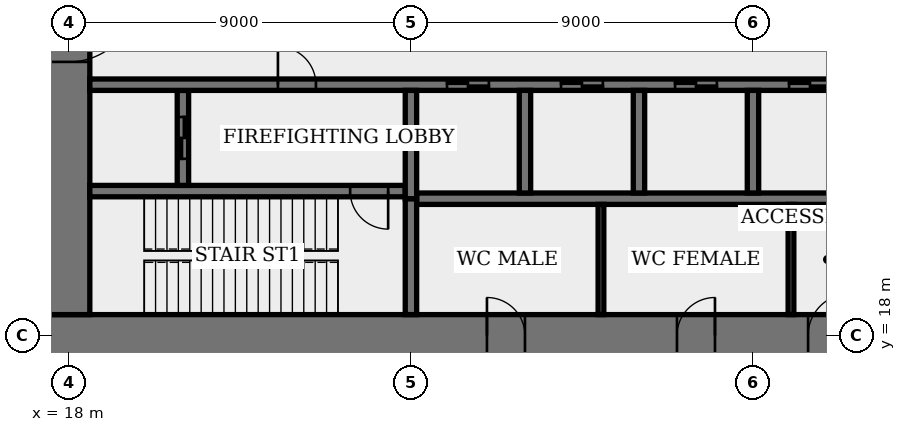
"""IFC4 building model, lengths in metres.
Left out: names, types, materials, properties, quantities, classifications, styles, units other than length and angle.
Written with IfcOpenShell. Run it as: python <this file> out.ifc"""

import sys

from ifc_helpers import new_model, si_unit, direction, frame, frame_2d, origin, place, context, subcontext, project, spatial, rectangle, extrude, element, fill, save


model = new_model("IFC4")
c1 = context("Model", 3, precision=1e-05, world=origin(), true_north=direction((0.0, 1.0)))
c2 = subcontext(c1, "Body", "Model", "MODEL_VIEW")
j1 = project(units=[si_unit("LENGTHUNIT", "METRE"), si_unit("PLANEANGLEUNIT", "RADIAN")], contexts=[c1])
p1 = place(None, origin())
s1 = spatial("IfcSite", under=j1, at=p1, CompositionType="ELEMENT")
p2 = place(p1, origin())
s2 = spatial("IfcBuilding", under=s1, at=p2, CompositionType="ELEMENT")
p3 = place(p2, origin())
s3 = spatial("IfcBuildingStorey", under=s2, at=p3, CompositionType="ELEMENT", Elevation=0.0)
p4 = place(p3, frame((17.45, 18.0, 0.0), z_axis=(0.0, 0.0, 1.0), x_axis=(1.0, 0.0, 0.0)))
e1 = element("IfcWall", 1, at=p4, inside=s3, PredefinedType="SHEAR", context=c2, shape_type="SweptSolid", body=[
    extrude(rectangle(XDim=28.1, YDim=1.1, at=frame_2d((14.05, 0.0))), origin(), (0.0, 0.0, 1.0), 5.4),
])
p5 = place(p4, frame((11.55, 0.0, 0.0)))
e2 = element("IfcOpeningElement", 2, at=p5, cuts=e1, PredefinedType="OPENING", context=c2, shape_type="SweptSolid", body=[
    extrude(rectangle(XDim=1.0, YDim=2.4, at=frame_2d((0.5, 1.2))), frame((0.0, 0.56, 0.0), z_axis=(0.0, -1.0, 0.0), x_axis=(1.0, 0.0, 0.0)), (0.0, 0.0, 1.0), 1.12),
])
p6 = place(p4, frame((16.55, 0.0, 0.0)))
e3 = element("IfcOpeningElement", 3, at=p6, cuts=e1, PredefinedType="OPENING", context=c2, shape_type="SweptSolid", body=[
    extrude(rectangle(XDim=1.0, YDim=2.4, at=frame_2d((0.5, 1.2))), frame((0.0, 0.56, 0.0), z_axis=(0.0, -1.0, 0.0), x_axis=(1.0, 0.0, 0.0)), (0.0, 0.0, 1.0), 1.12),
])
p7 = place(p4, frame((20.0, 0.0, 0.0)))
e4 = element("IfcOpeningElement", 4, at=p7, cuts=e1, PredefinedType="OPENING", context=c2, shape_type="SweptSolid", body=[
    extrude(rectangle(XDim=1.1, YDim=2.4, at=frame_2d((0.55, 1.2))), frame((0.0, 0.56, 0.0), z_axis=(0.0, -1.0, 0.0), x_axis=(1.0, 0.0, 0.0)), (0.0, 0.0, 1.0), 1.12),
])
p8 = place(p4, frame((24.05, 0.0, 0.0)))
e5 = element("IfcOpeningElement", 5, at=p8, cuts=e1, PredefinedType="OPENING", context=c2, shape_type="SweptSolid", body=[
    extrude(rectangle(XDim=1.0, YDim=2.4, at=frame_2d((0.5, 1.2))), frame((0.0, 0.56, 0.0), z_axis=(0.0, -1.0, 0.0), x_axis=(1.0, 0.0, 0.0)), (0.0, 0.0, 1.0), 1.12),
])
p9 = place(p3, frame((18.0, 35.45, 0.0), z_axis=(0.0, 0.0, 1.0), x_axis=(0.0, -1.0, 0.0)))
e6 = element("IfcWall", 6, at=p9, inside=s3, PredefinedType="SHEAR", context=c2, shape_type="SweptSolid", body=[
    extrude(rectangle(XDim=16.9, YDim=1.1, at=frame_2d((8.45, 0.0))), origin(), (0.0, 0.0, 1.0), 5.4),
])
p10 = place(p9, frame((8.45, 0.0, 0.0)))
e7 = element("IfcOpeningElement", 7, at=p10, cuts=e6, PredefinedType="OPENING", context=c2, shape_type="SweptSolid", body=[
    extrude(rectangle(XDim=1.8, YDim=2.4, at=frame_2d((0.9, 1.2))), frame((0.0, 0.56, 0.0), z_axis=(0.0, -1.0, 0.0), x_axis=(1.0, 0.0, 0.0)), (0.0, 0.0, 1.0), 1.12),
])
p11 = place(p3, frame((18.55, 21.8, 0.0), z_axis=(0.0, 0.0, 1.0), x_axis=(1.0, 0.0, 0.0)))
e8 = element("IfcWall", 8, at=p11, inside=s3, PredefinedType="SHEAR", context=c2, shape_type="SweptSolid", body=[
    extrude(rectangle(XDim=8.3, YDim=0.3, at=frame_2d((4.15, 0.0))), origin(), (0.0, 0.0, 1.0), 5.4),
])
p12 = place(p11, frame((6.85, 0.0, 0.0)))
e9 = element("IfcOpeningElement", 9, at=p12, cuts=e8, PredefinedType="OPENING", context=c2, shape_type="SweptSolid", body=[
    extrude(rectangle(XDim=1.0, YDim=2.4, at=frame_2d((0.5, 1.2))), frame((0.0, 0.16, 0.0), z_axis=(0.0, -1.0, 0.0), x_axis=(1.0, 0.0, 0.0)), (0.0, 0.0, 1.0), 0.32),
])
p13 = place(p3, frame((27.0, 18.55, 0.0), z_axis=(0.0, 0.0, 1.0), x_axis=(0.0, 1.0, 0.0)))
e10 = element("IfcWall", 10, at=p13, inside=s3, PredefinedType="SHEAR", context=c2, shape_type="SweptSolid", body=[
    extrude(rectangle(XDim=3.05, YDim=0.3, at=frame_2d((1.525, 0.0))), origin(), (0.0, 0.0, 1.0), 5.4),
])
p14 = place(p3, frame((21.0, 21.95, 0.0), z_axis=(0.0, 0.0, 1.0), x_axis=(0.0, 1.0, 0.0)))
e11 = element("IfcWall", 11, at=p14, inside=s3, PredefinedType="SHEAR", context=c2, shape_type="SweptSolid", body=[
    extrude(rectangle(XDim=2.5, YDim=0.3, at=frame_2d((1.25, 0.0))), origin(), (0.0, 0.0, 1.0), 5.4),
])
p15 = place(p14, frame((0.7, 0.0, 0.0)))
e12 = element("IfcOpeningElement", 12, at=p15, cuts=e11, PredefinedType="OPENING", context=c2, shape_type="SweptSolid", body=[
    extrude(rectangle(XDim=1.1, YDim=2.4, at=frame_2d((0.55, 1.2))), frame((0.0, 0.16, 0.0), z_axis=(0.0, -1.0, 0.0), x_axis=(1.0, 0.0, 0.0)), (0.0, 0.0, 1.0), 0.32),
])
p16 = place(p3, frame((18.55, 24.6, 0.0), z_axis=(0.0, 0.0, 1.0), x_axis=(1.0, 0.0, 0.0)))
e13 = element("IfcWall", 13, at=p16, inside=s3, PredefinedType="SHEAR", context=c2, shape_type="SweptSolid", body=[
    extrude(rectangle(XDim=25.9, YDim=0.3, at=frame_2d((12.95, 0.0))), origin(), (0.0, 0.0, 1.0), 5.4),
])
p17 = place(p16, frame((4.95, 0.0, 0.0)))
e14 = element("IfcOpeningElement", 14, at=p17, cuts=e13, PredefinedType="OPENING", context=c2, shape_type="SweptSolid", body=[
    extrude(rectangle(XDim=1.0, YDim=2.4, at=frame_2d((0.5, 1.2))), frame((0.0, 0.16, 0.0), z_axis=(0.0, -1.0, 0.0), x_axis=(1.0, 0.0, 0.0)), (0.0, 0.0, 1.0), 0.32),
])
p18 = place(p16, frame((24.5, 0.0, 0.0)))
e15 = element("IfcOpeningElement", 15, at=p18, cuts=e13, PredefinedType="OPENING", context=c2, shape_type="SweptSolid", body=[
    extrude(rectangle(XDim=0.9, YDim=2.1, at=frame_2d((0.45, 1.05))), frame((0.0, 0.16, 0.0), z_axis=(0.0, -1.0, 0.0), x_axis=(1.0, 0.0, 0.0)), (0.0, 0.0, 1.0), 0.32),
])
p19 = place(p16, frame((9.4, 0.0, 0.0)))
e16 = element("IfcOpeningElement", 16, at=p19, cuts=e13, PredefinedType="OPENING", context=c2, shape_type="SweptSolid", body=[
    extrude(rectangle(XDim=1.1, YDim=2.4, at=frame_2d((0.55, 1.2))), frame((0.0, 0.16, 0.0), z_axis=(0.0, -1.0, 0.0), x_axis=(1.0, 0.0, 0.0)), (0.0, 0.0, 1.0), 0.32),
])
p20 = place(p16, frame((12.4, 0.0, 0.0)))
e17 = element("IfcOpeningElement", 17, at=p20, cuts=e13, PredefinedType="OPENING", context=c2, shape_type="SweptSolid", body=[
    extrude(rectangle(XDim=1.1, YDim=2.4, at=frame_2d((0.55, 1.2))), frame((0.0, 0.16, 0.0), z_axis=(0.0, -1.0, 0.0), x_axis=(1.0, 0.0, 0.0)), (0.0, 0.0, 1.0), 0.32),
])
p21 = place(p16, frame((15.4, 0.0, 0.0)))
e18 = element("IfcOpeningElement", 18, at=p21, cuts=e13, PredefinedType="OPENING", context=c2, shape_type="SweptSolid", body=[
    extrude(rectangle(XDim=1.1, YDim=2.4, at=frame_2d((0.55, 1.2))), frame((0.0, 0.16, 0.0), z_axis=(0.0, -1.0, 0.0), x_axis=(1.0, 0.0, 0.0)), (0.0, 0.0, 1.0), 0.32),
])
p22 = place(p16, frame((18.4, 0.0, 0.0)))
e19 = element("IfcOpeningElement", 19, at=p22, cuts=e13, PredefinedType="OPENING", context=c2, shape_type="SweptSolid", body=[
    extrude(rectangle(XDim=1.1, YDim=2.4, at=frame_2d((0.55, 1.2))), frame((0.0, 0.16, 0.0), z_axis=(0.0, -1.0, 0.0), x_axis=(1.0, 0.0, 0.0)), (0.0, 0.0, 1.0), 0.32),
])
p23 = place(p16, frame((21.3, 0.0, 0.0)))
e20 = element("IfcOpeningElement", 20, at=p23, cuts=e13, PredefinedType="OPENING", context=c2, shape_type="SweptSolid", body=[
    extrude(rectangle(XDim=1.3, YDim=2.4, at=frame_2d((0.65, 1.2))), frame((0.0, 0.16, 0.0), z_axis=(0.0, -1.0, 0.0), x_axis=(1.0, 0.0, 0.0)), (0.0, 0.0, 1.0), 0.32),
])
p24 = place(p3, frame((27.15, 21.6, 0.0), z_axis=(0.0, 0.0, 1.0), x_axis=(1.0, 0.0, 0.0)))
e21 = element("IfcWall", 21, at=p24, inside=s3, PredefinedType="SHEAR", context=c2, shape_type="SweptSolid", body=[
    extrude(rectangle(XDim=17.3, YDim=0.3, at=frame_2d((8.65, 0.0))), origin(), (0.0, 0.0, 1.0), 5.4),
])
for number, where, z_axis, x_axis in (
    (22, (30.0, 21.75, 0.0), (0.0, 0.0, 1.0), (0.0, 1.0, 0.0)),
    (23, (33.0, 21.75, 0.0), (0.0, 0.0, 1.0), (0.0, 1.0, 0.0)),
    (24, (36.0, 21.75, 0.0), (0.0, 0.0, 1.0), (0.0, 1.0, 0.0)),
):
    element("IfcWall", number, at=place(p3, frame(where, z_axis=z_axis, x_axis=x_axis)), inside=s3, PredefinedType="SHEAR", context=c2, shape_type="SweptSolid", body=[
        extrude(rectangle(XDim=2.7, YDim=0.3, at=frame_2d((1.35, 0.0))), origin(), (0.0, 0.0, 1.0), 5.4),
    ])
p25 = place(p3, frame((27.0, 21.6, 0.0), z_axis=(0.0, 0.0, 1.0), x_axis=(0.0, 1.0, 0.0)))
e25 = element("IfcWall", 25, at=p25, inside=s3, PredefinedType="SHEAR", context=c2, shape_type="SweptSolid", body=[
    extrude(rectangle(XDim=2.85, YDim=0.3, at=frame_2d((1.425, 0.0))), origin(), (0.0, 0.0, 1.0), 5.4),
])
for number, where, z_axis, x_axis in (
    (26, (32.0, 18.55, 0.0), (0.0, 0.0, 1.0), (0.0, 1.0, 0.0)),
    (27, (37.0, 18.55, 0.0), (0.0, 0.0, 1.0), (0.0, 1.0, 0.0)),
):
    element("IfcWall", number, at=place(p3, frame(where, z_axis=z_axis, x_axis=x_axis)), inside=s3, PredefinedType="PARTITIONING", context=c2, shape_type="SweptSolid", body=[
        extrude(rectangle(XDim=2.9, YDim=0.15, at=frame_2d((1.45, 0.0))), origin(), (0.0, 0.0, 1.0), 5.1),
    ])
p26 = place(p10, origin())
e28 = element("IfcDoor", 28, at=p26, inside=s3, OperationType="DOUBLE_DOOR_DOUBLE_SWING", PredefinedType="DOOR", context=c2, shape_type="SweptSolid", body=[
    extrude(rectangle(XDim=1.8, YDim=2.4, at=frame_2d((0.9, 1.2))), frame((0.0, 0.03, 0.0), z_axis=(0.0, -1.0, 0.0), x_axis=(1.0, 0.0, 0.0)), (0.0, 0.0, 1.0), 0.06),
    extrude(rectangle(XDim=0.04, YDim=2.4, at=frame_2d((0.02, 1.2))), frame((0.0, 0.55, 0.0), z_axis=(0.0, -1.0, 0.0), x_axis=(1.0, 0.0, 0.0)), (0.0, 0.0, 1.0), 1.1),
    extrude(rectangle(XDim=0.04, YDim=2.4, at=frame_2d((1.78, 1.2))), frame((0.0, 0.55, 0.0), z_axis=(0.0, -1.0, 0.0), x_axis=(1.0, 0.0, 0.0)), (0.0, 0.0, 1.0), 1.1),
    extrude(rectangle(XDim=1.8, YDim=0.04, at=frame_2d((0.9, 2.38))), frame((0.0, 0.55, 0.0), z_axis=(0.0, -1.0, 0.0), x_axis=(1.0, 0.0, 0.0)), (0.0, 0.0, 1.0), 1.1),
])
fill(e7, e28)
p27 = place(p5, origin())
e29 = element("IfcDoor", 29, at=p27, inside=s3, OperationType="SINGLE_SWING_RIGHT", PredefinedType="DOOR", context=c2, shape_type="SweptSolid", body=[
    extrude(rectangle(XDim=1.0, YDim=2.4, at=frame_2d((0.5, 1.2))), frame((0.0, 0.025, 0.0), z_axis=(0.0, -1.0, 0.0), x_axis=(1.0, 0.0, 0.0)), (0.0, 0.0, 1.0), 0.05),
    extrude(rectangle(XDim=0.04, YDim=2.4, at=frame_2d((0.02, 1.2))), frame((0.0, 0.4, 0.0), z_axis=(0.0, -1.0, 0.0), x_axis=(1.0, 0.0, 0.0)), (0.0, 0.0, 1.0), 0.8),
    extrude(rectangle(XDim=0.04, YDim=2.4, at=frame_2d((0.98, 1.2))), frame((0.0, 0.4, 0.0), z_axis=(0.0, -1.0, 0.0), x_axis=(1.0, 0.0, 0.0)), (0.0, 0.0, 1.0), 0.8),
    extrude(rectangle(XDim=1.0, YDim=0.04, at=frame_2d((0.5, 2.38))), frame((0.0, 0.4, 0.0), z_axis=(0.0, -1.0, 0.0), x_axis=(1.0, 0.0, 0.0)), (0.0, 0.0, 1.0), 0.8),
])
fill(e2, e29)
p28 = place(p6, origin())
e30 = element("IfcDoor", 30, at=p28, inside=s3, OperationType="SINGLE_SWING_LEFT", PredefinedType="DOOR", context=c2, shape_type="SweptSolid", body=[
    extrude(rectangle(XDim=1.0, YDim=2.4, at=frame_2d((0.5, 1.2))), frame((0.0, 0.025, 0.0), z_axis=(0.0, -1.0, 0.0), x_axis=(1.0, 0.0, 0.0)), (0.0, 0.0, 1.0), 0.05),
    extrude(rectangle(XDim=0.04, YDim=2.4, at=frame_2d((0.02, 1.2))), frame((0.0, 0.4, 0.0), z_axis=(0.0, -1.0, 0.0), x_axis=(1.0, 0.0, 0.0)), (0.0, 0.0, 1.0), 0.8),
    extrude(rectangle(XDim=0.04, YDim=2.4, at=frame_2d((0.98, 1.2))), frame((0.0, 0.4, 0.0), z_axis=(0.0, -1.0, 0.0), x_axis=(1.0, 0.0, 0.0)), (0.0, 0.0, 1.0), 0.8),
    extrude(rectangle(XDim=1.0, YDim=0.04, at=frame_2d((0.5, 2.38))), frame((0.0, 0.4, 0.0), z_axis=(0.0, -1.0, 0.0), x_axis=(1.0, 0.0, 0.0)), (0.0, 0.0, 1.0), 0.8),
])
fill(e3, e30)
p29 = place(p7, origin())
e31 = element("IfcDoor", 31, at=p29, inside=s3, OperationType="SINGLE_SWING_LEFT", PredefinedType="DOOR", context=c2, shape_type="SweptSolid", body=[
    extrude(rectangle(XDim=1.1, YDim=2.4, at=frame_2d((0.55, 1.2))), frame((0.0, 0.025, 0.0), z_axis=(0.0, -1.0, 0.0), x_axis=(1.0, 0.0, 0.0)), (0.0, 0.0, 1.0), 0.05),
    extrude(rectangle(XDim=0.04, YDim=2.4, at=frame_2d((0.02, 1.2))), frame((0.0, 0.44, 0.0), z_axis=(0.0, -1.0, 0.0), x_axis=(1.0, 0.0, 0.0)), (0.0, 0.0, 1.0), 0.88),
    extrude(rectangle(XDim=0.04, YDim=2.4, at=frame_2d((1.08, 1.2))), frame((0.0, 0.44, 0.0), z_axis=(0.0, -1.0, 0.0), x_axis=(1.0, 0.0, 0.0)), (0.0, 0.0, 1.0), 0.88),
    extrude(rectangle(XDim=1.1, YDim=0.04, at=frame_2d((0.55, 2.38))), frame((0.0, 0.44, 0.0), z_axis=(0.0, -1.0, 0.0), x_axis=(1.0, 0.0, 0.0)), (0.0, 0.0, 1.0), 0.88),
])
fill(e4, e31)
p30 = place(p12, origin())
e32 = element("IfcDoor", 32, at=p30, inside=s3, OperationType="SINGLE_SWING_RIGHT", PredefinedType="DOOR", context=c2, shape_type="SweptSolid", body=[
    extrude(rectangle(XDim=1.0, YDim=2.4, at=frame_2d((0.5, 1.2))), frame((0.0, 0.03, 0.0), z_axis=(0.0, -1.0, 0.0), x_axis=(1.0, 0.0, 0.0)), (0.0, 0.0, 1.0), 0.06),
])
fill(e9, e32)
p31 = place(p17, origin())
e33 = element("IfcDoor", 33, at=p31, inside=s3, OperationType="SINGLE_SWING_RIGHT", PredefinedType="DOOR", context=c2, shape_type="SweptSolid", body=[
    extrude(rectangle(XDim=1.0, YDim=2.4, at=frame_2d((0.5, 1.2))), frame((0.0, 0.03, 0.0), z_axis=(0.0, -1.0, 0.0), x_axis=(1.0, 0.0, 0.0)), (0.0, 0.0, 1.0), 0.06),
])
fill(e14, e33)
p32 = place(p19, origin())
e34 = element("IfcDoor", 34, at=p32, inside=s3, OperationType="DOUBLE_DOOR_SLIDING", PredefinedType="DOOR", context=c2, shape_type="SweptSolid", body=[
    extrude(rectangle(XDim=1.1, YDim=2.4, at=frame_2d((0.55, 1.2))), frame((0.0, 0.02, 0.0), z_axis=(0.0, -1.0, 0.0), x_axis=(1.0, 0.0, 0.0)), (0.0, 0.0, 1.0), 0.04),
])
fill(e16, e34)
p33 = place(p20, origin())
e35 = element("IfcDoor", 35, at=p33, inside=s3, OperationType="DOUBLE_DOOR_SLIDING", PredefinedType="DOOR", context=c2, shape_type="SweptSolid", body=[
    extrude(rectangle(XDim=1.1, YDim=2.4, at=frame_2d((0.55, 1.2))), frame((0.0, 0.02, 0.0), z_axis=(0.0, -1.0, 0.0), x_axis=(1.0, 0.0, 0.0)), (0.0, 0.0, 1.0), 0.04),
])
fill(e17, e35)
p34 = place(p21, origin())
e36 = element("IfcDoor", 36, at=p34, inside=s3, OperationType="DOUBLE_DOOR_SLIDING", PredefinedType="DOOR", context=c2, shape_type="SweptSolid", body=[
    extrude(rectangle(XDim=1.1, YDim=2.4, at=frame_2d((0.55, 1.2))), frame((0.0, 0.02, 0.0), z_axis=(0.0, -1.0, 0.0), x_axis=(1.0, 0.0, 0.0)), (0.0, 0.0, 1.0), 0.04),
])
fill(e18, e36)
p35 = place(p22, origin())
e37 = element("IfcDoor", 37, at=p35, inside=s3, OperationType="DOUBLE_DOOR_SLIDING", PredefinedType="DOOR", context=c2, shape_type="SweptSolid", body=[
    extrude(rectangle(XDim=1.1, YDim=2.4, at=frame_2d((0.55, 1.2))), frame((0.0, 0.02, 0.0), z_axis=(0.0, -1.0, 0.0), x_axis=(1.0, 0.0, 0.0)), (0.0, 0.0, 1.0), 0.04),
])
fill(e19, e37)
p36 = place(p15, origin())
e38 = element("IfcDoor", 38, at=p36, inside=s3, OperationType="DOUBLE_DOOR_SLIDING", PredefinedType="DOOR", context=c2, shape_type="SweptSolid", body=[
    extrude(rectangle(XDim=1.1, YDim=2.4, at=frame_2d((0.55, 1.2))), frame((0.0, 0.03, 0.0), z_axis=(0.0, -1.0, 0.0), x_axis=(1.0, 0.0, 0.0)), (0.0, 0.0, 1.0), 0.06),
])
fill(e12, e38)
save(model, sys.argv[1])
